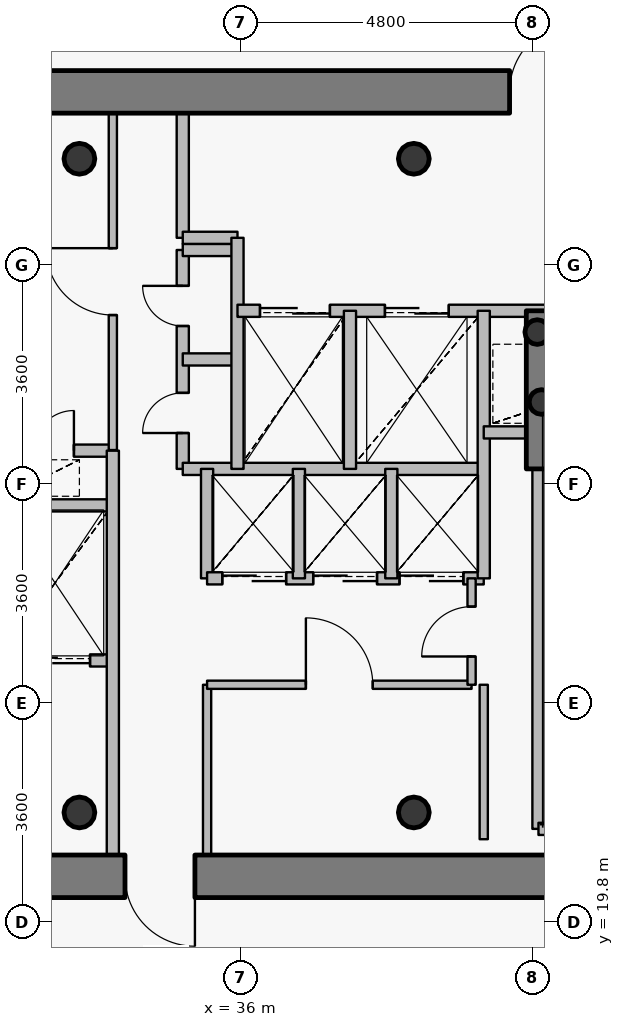
"""IFC4 building model, lengths in metres.
Left out: names, types, materials, properties, quantities, classifications, styles, units other than length and angle.
Written with IfcOpenShell. Run it as: python <this file> out.ifc"""

import sys

from ifc_helpers import new_model, si_unit, direction, frame, frame_2d, origin, origin_2d, place, context, subcontext, project, spatial, rectangle, hollow_circle, extrude, source, transform, mapped, element, fill, save


model = new_model("IFC4")
c1 = context("Model", 3, precision=1e-05, world=origin(), true_north=direction((0.0, 1.0)))
c2 = subcontext(c1, "Body", "Model", "MODEL_VIEW")
j1 = project(units=[si_unit("LENGTHUNIT", "METRE"), si_unit("PLANEANGLEUNIT", "RADIAN")], contexts=[c1])
p1 = place(None, origin())
s1 = spatial("IfcSite", under=j1, at=p1, CompositionType="ELEMENT")
p2 = place(p1, origin())
s2 = spatial("IfcBuilding", under=s1, at=p2, CompositionType="ELEMENT")
p3 = place(p2, frame((0.0, 0.0, 306.75)))
s3 = spatial("IfcBuildingStorey", under=s2, at=p3, CompositionType="ELEMENT", Elevation=306.75)
for number, where, z_axis, x_axis in (
    (1, (33.35, 21.6, 0.0), (0.0, 0.0, 1.0), (1.0, 0.0, 0.0)),
    (2, (38.85, 21.6, 0.0), (0.0, 0.0, 1.0), (1.0, 0.0, 0.0)),
    (3, (38.85, 32.35, 0.0), (0.0, 0.0, 1.0), (1.0, 0.0, 0.0)),
    (4, (33.35, 32.35, 0.0), (0.0, 0.0, 1.0), (1.0, 0.0, 0.0)),
):
    element("IfcColumn", number, at=place(p3, frame(where, z_axis=z_axis, x_axis=x_axis)), inside=s3, PredefinedType="COLUMN", context=c2, shape_type="SweptSolid", body=[
        extrude(hollow_circle(Radius=0.254, WallThickness=0.02, at=origin_2d()), origin(), (0.0, 0.0, 1.0), 3.75),
    ])
for number, where, z_axis, x_axis in (
    (5, (40.95, 28.35, 0.0), (0.0, 0.0, 1.0), (1.0, 0.0, 0.0)),
    (6, (40.88, 29.5, 0.0), (0.0, 0.0, 1.0), (1.0, 0.0, 0.0)),
):
    element("IfcColumn", number, at=place(p3, frame(where, z_axis=z_axis, x_axis=x_axis)), inside=s3, PredefinedType="COLUMN", context=c2, shape_type="SweptSolid", body=[
        extrude(hollow_circle(Radius=0.203, WallThickness=0.016, at=origin_2d()), origin(), (0.0, 0.0, 1.0), 3.75),
    ])
p4 = place(p3, frame((27.65, 33.45, 0.0), z_axis=(0.0, 0.0, 1.0), x_axis=(1.0, 0.0, 0.0)))
e7 = element("IfcWall", 7, at=p4, inside=s3, PredefinedType="SHEAR", context=c2, shape_type="SweptSolid", body=[
    extrude(rectangle(XDim=16.7, YDim=0.7, at=frame_2d((8.35, 0.0))), origin(), (0.0, 0.0, 1.0), 3.05),
])
p5 = place(p4, frame((12.775, 0.0, 0.0)))
e8 = element("IfcOpeningElement", 8, at=p5, cuts=e7, PredefinedType="OPENING", context=c2, shape_type="SweptSolid", body=[
    extrude(rectangle(XDim=1.15, YDim=2.15, at=origin_2d()), frame((0.575, 0.36, 1.075), z_axis=(0.0, -1.0, 0.0), x_axis=(1.0, 0.0, 0.0)), (0.0, 0.0, 1.0), 0.72),
])
p6 = place(p3, frame((44.35, 20.55, 0.0), z_axis=(0.0, 0.0, 1.0), x_axis=(-1.0, 0.0, 0.0)))
e9 = element("IfcWall", 9, at=p6, inside=s3, PredefinedType="SHEAR", context=c2, shape_type="SweptSolid", body=[
    extrude(rectangle(XDim=16.7, YDim=0.7, at=frame_2d((8.35, 0.0))), origin(), (0.0, 0.0, 1.0), 3.05),
])
p7 = place(p6, frame((12.925, 0.0, 0.0)))
e10 = element("IfcOpeningElement", 10, at=p7, cuts=e9, PredefinedType="OPENING", context=c2, shape_type="SweptSolid", body=[
    extrude(rectangle(XDim=1.15, YDim=2.15, at=origin_2d()), frame((0.575, 0.36, 1.075), z_axis=(0.0, -1.0, 0.0), x_axis=(1.0, 0.0, 0.0)), (0.0, 0.0, 1.0), 0.72),
])
p8 = place(p6, frame((9.1, 0.0, 0.0)))
e11 = element("IfcOpeningElement", 11, at=p8, cuts=e9, PredefinedType="OPENING", context=c2, shape_type="SweptSolid", body=[
    extrude(rectangle(XDim=1.15, YDim=2.15, at=origin_2d()), frame((0.575, 0.36, 1.075), z_axis=(0.0, -1.0, 0.0), x_axis=(1.0, 0.0, 0.0)), (0.0, 0.0, 1.0), 0.72),
])
p9 = place(p3, frame((40.9, 27.25, 0.0), z_axis=(0.0, 0.0, 1.0), x_axis=(0.0, 1.0, 0.0)))
e12 = element("IfcWall", 12, at=p9, inside=s3, PredefinedType="SHEAR", context=c2, shape_type="SweptSolid", body=[
    extrude(rectangle(XDim=2.6, YDim=0.4, at=frame_2d((1.3, 0.0))), origin(), (0.0, 0.0, 1.0), 3.1),
])
p10 = place(p3, frame((31.1, 27.55, 0.0), z_axis=(0.0, 0.0, 1.0), x_axis=(1.0, 0.0, 0.0)))
e13 = element("IfcWall", 13, at=p10, inside=s3, PredefinedType="PARTITIONING", context=c2, shape_type="SweptSolid", body=[
    extrude(rectangle(XDim=2.8, YDim=0.2, at=frame_2d((1.4, 0.0))), origin(), (0.0, 0.0, 1.0), 3.085),
])
p11 = place(p10, frame((1.5, 0.0, 0.0)))
e14 = element("IfcOpeningElement", 14, at=p11, cuts=e13, PredefinedType="OPENING", context=c2, shape_type="SweptSolid", body=[
    extrude(rectangle(XDim=0.66, YDim=2.05, at=origin_2d()), frame((0.33, 0.11, 1.025), z_axis=(0.0, -1.0, 0.0), x_axis=(1.0, 0.0, 0.0)), (0.0, 0.0, 1.0), 0.22),
])
p12 = place(p3, frame((32.0, 24.1, 0.0), z_axis=(0.0, 0.0, 1.0), x_axis=(1.0, 0.0, 0.0)))
e15 = element("IfcWall", 15, at=p12, inside=s3, PredefinedType="PARTITIONING", context=c2, shape_type="SweptSolid", body=[
    extrude(rectangle(XDim=1.9, YDim=0.2, at=frame_2d((0.95, 0.0))), origin(), (0.0, 0.0, 1.0), 3.085),
])
p13 = place(p12, frame((0.375, 0.0, 0.0)))
e16 = element("IfcOpeningElement", 16, at=p13, cuts=e15, PredefinedType="OPENING", context=c2, shape_type="SweptSolid", body=[
    extrude(rectangle(XDim=1.15, YDim=2.15, at=origin_2d()), frame((0.575, 0.11, 1.075), z_axis=(0.0, -1.0, 0.0), x_axis=(1.0, 0.0, 0.0)), (0.0, 0.0, 1.0), 0.22),
])
p14 = place(p3, frame((32.0, 26.65, 0.0), z_axis=(0.0, 0.0, 1.0), x_axis=(1.0, 0.0, 0.0)))
e17 = element("IfcWall", 17, at=p14, inside=s3, PredefinedType="PARTITIONING", context=c2, shape_type="SweptSolid", body=[
    extrude(rectangle(XDim=1.9, YDim=0.2, at=frame_2d((0.95, 0.0))), origin(), (0.0, 0.0, 1.0), 3.085),
])
p15 = place(p3, frame((33.9, 20.9, 0.0), z_axis=(0.0, 0.0, 1.0), x_axis=(0.0, 1.0, 0.0)))
e18 = element("IfcWall", 18, at=p15, inside=s3, PredefinedType="PARTITIONING", context=c2, shape_type="SweptSolid", body=[
    extrude(rectangle(XDim=6.65, YDim=0.2, at=frame_2d((3.325, 0.0))), origin(), (0.0, 0.0, 1.0), 3.085),
])
p16 = place(p3, frame((33.9, 27.56, 0.0), z_axis=(0.0, 0.0, 1.0), x_axis=(0.0, 1.0, 0.0)))
e19 = element("IfcWall", 19, at=p16, inside=s3, PredefinedType="PARTITIONING", context=c2, shape_type="SweptSolid", body=[
    extrude(rectangle(XDim=5.54, YDim=0.135, at=frame_2d((2.77, 0.0))), origin(), (0.0, 0.0, 1.0), 3.085),
])
p17 = place(p16, frame((2.22, 0.0, 0.0)))
e20 = element("IfcOpeningElement", 20, at=p17, cuts=e19, PredefinedType="OPENING", context=c2, shape_type="SweptSolid", body=[
    extrude(rectangle(XDim=1.1, YDim=2.15, at=origin_2d()), frame((0.55, 0.078, 1.075), z_axis=(0.0, -1.0, 0.0), x_axis=(1.0, 0.0, 0.0)), (0.0, 0.0, 1.0), 0.155),
])
p18 = place(p3, frame((35.05, 27.25, 0.0), z_axis=(0.0, 0.0, 1.0), x_axis=(0.0, 1.0, 0.0)))
e21 = element("IfcWall", 21, at=p18, inside=s3, PredefinedType="PARTITIONING", context=c2, shape_type="SweptSolid", body=[
    extrude(rectangle(XDim=3.6, YDim=0.2, at=frame_2d((1.8, 0.0))), origin(), (0.0, 0.0, 1.0), 3.5),
])
p19 = place(p18, frame((0.59, 0.0, 0.0)))
e22 = element("IfcOpeningElement", 22, at=p19, cuts=e21, PredefinedType="OPENING", context=c2, shape_type="SweptSolid", body=[
    extrude(rectangle(XDim=0.66, YDim=2.05, at=origin_2d()), frame((0.33, 0.11, 1.025), z_axis=(0.0, -1.0, 0.0), x_axis=(1.0, 0.0, 0.0)), (0.0, 0.0, 1.0), 0.22),
])
p20 = place(p18, frame((2.35, 0.0, 0.0)))
e23 = element("IfcOpeningElement", 23, at=p20, cuts=e21, PredefinedType="OPENING", context=c2, shape_type="SweptSolid", body=[
    extrude(rectangle(XDim=0.66, YDim=2.05, at=origin_2d()), frame((0.33, 0.11, 1.025), z_axis=(0.0, -1.0, 0.0), x_axis=(1.0, 0.0, 0.0)), (0.0, 0.0, 1.0), 0.22),
])
p21 = place(p3, frame((35.05, 27.25, 0.0), z_axis=(0.0, 0.0, 1.0), x_axis=(1.0, 0.0, 0.0)))
e24 = element("IfcWall", 24, at=p21, inside=s3, PredefinedType="PARTITIONING", context=c2, shape_type="SweptSolid", body=[
    extrude(rectangle(XDim=4.95, YDim=0.2, at=frame_2d((2.475, 0.0))), origin(), (0.0, 0.0, 1.0), 3.085),
])
for number, where, z_axis, x_axis in (
    (25, (35.05, 29.05, 0.0), (0.0, 0.0, 1.0), (1.0, 0.0, 0.0)),
    (26, (35.05, 30.85, 0.0), (0.0, 0.0, 1.0), (1.0, 0.0, 0.0)),
):
    element("IfcWall", number, at=place(p3, frame(where, z_axis=z_axis, x_axis=x_axis)), inside=s3, PredefinedType="PARTITIONING", context=c2, shape_type="SweptSolid", body=[
        extrude(rectangle(XDim=0.9, YDim=0.2, at=frame_2d((0.45, 0.0))), origin(), (0.0, 0.0, 1.0), 3.5),
    ])
p22 = place(p3, frame((35.05, 31.05, 0.0), z_axis=(0.0, 0.0, 1.0), x_axis=(0.0, 1.0, 0.0)))
e27 = element("IfcWall", 27, at=p22, inside=s3, PredefinedType="PARTITIONING", context=c2, shape_type="SweptSolid", body=[
    extrude(rectangle(XDim=2.05, YDim=0.2, at=frame_2d((1.025, 0.0))), origin(), (0.0, 0.0, 1.0), 3.085),
])
p23 = place(p3, frame((35.05, 31.05, 0.0), z_axis=(0.0, 0.0, 1.0), x_axis=(1.0, 0.0, 0.0)))
e28 = element("IfcWall", 28, at=p23, inside=s3, PredefinedType="PARTITIONING", context=c2, shape_type="SweptSolid", body=[
    extrude(rectangle(XDim=0.9, YDim=0.2, at=frame_2d((0.45, 0.0))), origin(), (0.0, 0.0, 1.0), 3.5),
])
p24 = place(p3, frame((35.45, 20.9, 0.0), z_axis=(0.0, 0.0, 1.0), x_axis=(0.0, 1.0, 0.0)))
e29 = element("IfcWall", 29, at=p24, inside=s3, PredefinedType="PARTITIONING", context=c2, shape_type="SweptSolid", body=[
    extrude(rectangle(XDim=2.8, YDim=0.135, at=frame_2d((1.4, 0.0))), origin(), (0.0, 0.0, 1.0), 3.085),
])
p25 = place(p3, frame((35.45, 23.7, 0.0), z_axis=(0.0, 0.0, 1.0), x_axis=(1.0, 0.0, 0.0)))
e30 = element("IfcWall", 30, at=p25, inside=s3, PredefinedType="PARTITIONING", context=c2, shape_type="SweptSolid", body=[
    extrude(rectangle(XDim=4.35, YDim=0.135, at=frame_2d((2.175, 0.0))), origin(), (0.0, 0.0, 1.0), 3.085),
])
p26 = place(p25, frame((1.625, 0.0, 0.0)))
e31 = element("IfcOpeningElement", 31, at=p26, cuts=e30, PredefinedType="OPENING", context=c2, shape_type="SweptSolid", body=[
    extrude(rectangle(XDim=1.1, YDim=2.15, at=origin_2d()), frame((0.55, 0.078, 1.075), z_axis=(0.0, -1.0, 0.0), x_axis=(1.0, 0.0, 0.0)), (0.0, 0.0, 1.0), 0.155),
])
p27 = place(p3, frame((35.45, 25.45, 0.0), z_axis=(0.0, 0.0, 1.0), x_axis=(0.0, 1.0, 0.0)))
e32 = element("IfcWall", 32, at=p27, inside=s3, PredefinedType="PARTITIONING", context=c2, shape_type="SweptSolid", body=[
    extrude(rectangle(XDim=1.8, YDim=0.2, at=frame_2d((0.9, 0.0))), origin(), (0.0, 0.0, 1.0), 3.5),
])
p28 = place(p3, frame((35.45, 25.45, 0.0), z_axis=(0.0, 0.0, 1.0), x_axis=(1.0, 0.0, 0.0)))
e33 = element("IfcWall", 33, at=p28, inside=s3, PredefinedType="PARTITIONING", context=c2, shape_type="SweptSolid", body=[
    extrude(rectangle(XDim=4.55, YDim=0.2, at=frame_2d((2.275, 0.0))), origin(), (0.0, 0.0, 1.0), 3.085),
])
p29 = place(p28, frame((0.25, 0.0, 0.0)))
e34 = element("IfcOpeningElement", 34, at=p29, cuts=e33, PredefinedType="OPENING", context=c2, shape_type="SweptSolid", body=[
    extrude(rectangle(XDim=1.05, YDim=2.15, at=origin_2d()), frame((0.525, 0.11, 1.075), z_axis=(0.0, -1.0, 0.0), x_axis=(1.0, 0.0, 0.0)), (0.0, 0.0, 1.0), 0.22),
])
p30 = place(p28, frame((1.745, 0.0, 0.0)))
e35 = element("IfcOpeningElement", 35, at=p30, cuts=e33, PredefinedType="OPENING", context=c2, shape_type="SweptSolid", body=[
    extrude(rectangle(XDim=1.05, YDim=2.15, at=origin_2d()), frame((0.525, 0.11, 1.075), z_axis=(0.0, -1.0, 0.0), x_axis=(1.0, 0.0, 0.0)), (0.0, 0.0, 1.0), 0.22),
])
p31 = place(p28, frame((3.165, 0.0, 0.0)))
e36 = element("IfcOpeningElement", 36, at=p31, cuts=e33, PredefinedType="OPENING", context=c2, shape_type="SweptSolid", body=[
    extrude(rectangle(XDim=1.05, YDim=2.15, at=origin_2d()), frame((0.525, 0.11, 1.075), z_axis=(0.0, -1.0, 0.0), x_axis=(1.0, 0.0, 0.0)), (0.0, 0.0, 1.0), 0.22),
])
p32 = place(p3, frame((35.95, 27.25, 0.0), z_axis=(0.0, 0.0, 1.0), x_axis=(0.0, 1.0, 0.0)))
e37 = element("IfcWall", 37, at=p32, inside=s3, PredefinedType="PARTITIONING", context=c2, shape_type="SweptSolid", body=[
    extrude(rectangle(XDim=3.8, YDim=0.2, at=frame_2d((1.9, 0.0))), origin(), (0.0, 0.0, 1.0), 3.5),
])
p33 = place(p3, frame((35.95, 29.85, 0.0), z_axis=(0.0, 0.0, 1.0), x_axis=(1.0, 0.0, 0.0)))
e38 = element("IfcWall", 38, at=p33, inside=s3, PredefinedType="PARTITIONING", context=c2, shape_type="SweptSolid", body=[
    extrude(rectangle(XDim=8.49, YDim=0.2, at=frame_2d((4.245, 0.0))), origin(), (0.0, 0.0, 1.0), 3.085),
])
p34 = place(p33, frame((6.1, 0.0, 0.0)))
e39 = element("IfcOpeningElement", 39, at=p34, cuts=e38, PredefinedType="OPENING", context=c2, shape_type="SweptSolid", body=[
    extrude(rectangle(XDim=1.2, YDim=2.15, at=origin_2d()), frame((0.6, 0.11, 1.075), z_axis=(0.0, -1.0, 0.0), x_axis=(1.0, 0.0, 0.0)), (0.0, 0.0, 1.0), 0.22),
])
p35 = place(p33, frame((0.37, 0.0, 0.0)))
e40 = element("IfcOpeningElement", 40, at=p35, cuts=e38, PredefinedType="OPENING", context=c2, shape_type="SweptSolid", body=[
    extrude(rectangle(XDim=1.15, YDim=2.15, at=origin_2d()), frame((0.575, 0.11, 1.075), z_axis=(0.0, -1.0, 0.0), x_axis=(1.0, 0.0, 0.0)), (0.0, 0.0, 1.0), 0.22),
])
p36 = place(p33, frame((2.425, 0.0, 0.0)))
e41 = element("IfcOpeningElement", 41, at=p36, cuts=e38, PredefinedType="OPENING", context=c2, shape_type="SweptSolid", body=[
    extrude(rectangle(XDim=1.05, YDim=2.15, at=origin_2d()), frame((0.525, 0.11, 1.075), z_axis=(0.0, -1.0, 0.0), x_axis=(1.0, 0.0, 0.0)), (0.0, 0.0, 1.0), 0.22),
])
p37 = place(p3, frame((36.96, 25.45, 0.0), z_axis=(0.0, 0.0, 1.0), x_axis=(0.0, 1.0, 0.0)))
e42 = element("IfcWall", 42, at=p37, inside=s3, PredefinedType="PARTITIONING", context=c2, shape_type="SweptSolid", body=[
    extrude(rectangle(XDim=1.8, YDim=0.2, at=frame_2d((0.9, 0.0))), origin(), (0.0, 0.0, 1.0), 3.5),
])
p38 = place(p3, frame((37.8, 27.25, 0.0), z_axis=(0.0, 0.0, 1.0), x_axis=(0.0, 1.0, 0.0)))
e43 = element("IfcWall", 43, at=p38, inside=s3, PredefinedType="PARTITIONING", context=c2, shape_type="SweptSolid", body=[
    extrude(rectangle(XDim=2.6, YDim=0.2, at=frame_2d((1.3, 0.0))), origin(), (0.0, 0.0, 1.0), 3.5),
])
p39 = place(p3, frame((38.48, 25.45, 0.0), z_axis=(0.0, 0.0, 1.0), x_axis=(0.0, 1.0, 0.0)))
e44 = element("IfcWall", 44, at=p39, inside=s3, PredefinedType="PARTITIONING", context=c2, shape_type="SweptSolid", body=[
    extrude(rectangle(XDim=1.8, YDim=0.2, at=frame_2d((0.9, 0.0))), origin(), (0.0, 0.0, 1.0), 3.5),
])
p40 = place(p3, frame((39.8, 23.7, 0.0), z_axis=(0.0, 0.0, 1.0), x_axis=(0.0, 1.0, 0.0)))
e45 = element("IfcWall", 45, at=p40, inside=s3, PredefinedType="PARTITIONING", context=c2, shape_type="SweptSolid", body=[
    extrude(rectangle(XDim=1.75, YDim=0.135, at=frame_2d((0.875, 0.0))), origin(), (0.0, 0.0, 1.0), 3.5),
])
p41 = place(p40, frame((0.465, 0.0, 0.0)))
e46 = element("IfcOpeningElement", 46, at=p41, cuts=e45, PredefinedType="OPENING", context=c2, shape_type="SweptSolid", body=[
    extrude(rectangle(XDim=0.82, YDim=2.1, at=origin_2d()), frame((0.41, 0.078, 1.05), z_axis=(0.0, -1.0, 0.0), x_axis=(1.0, 0.0, 0.0)), (0.0, 0.0, 1.0), 0.155),
])
p42 = place(p3, frame((40.0, 25.45, 0.0), z_axis=(0.0, 0.0, 1.0), x_axis=(0.0, 1.0, 0.0)))
e47 = element("IfcWall", 47, at=p42, inside=s3, PredefinedType="PARTITIONING", context=c2, shape_type="SweptSolid", body=[
    extrude(rectangle(XDim=4.4, YDim=0.2, at=frame_2d((2.2, 0.0))), origin(), (0.0, 0.0, 1.0), 3.5),
])
p43 = place(p3, frame((40.0, 27.85, 0.0), z_axis=(0.0, 0.0, 1.0), x_axis=(1.0, 0.0, 0.0)))
e48 = element("IfcWall", 48, at=p43, inside=s3, PredefinedType="PARTITIONING", context=c2, shape_type="SweptSolid", body=[
    extrude(rectangle(XDim=0.9, YDim=0.2, at=frame_2d((0.45, 0.0))), origin(), (0.0, 0.0, 1.0), 3.5),
])
p44 = place(p3, frame((40.9, 21.33, 0.0), z_axis=(0.0, 0.0, 1.0), x_axis=(0.0, 1.0, 0.0)))
e49 = element("IfcWall", 49, at=p44, inside=s3, PredefinedType="PARTITIONING", context=c2, shape_type="SweptSolid", body=[
    extrude(rectangle(XDim=5.91, YDim=0.2, at=frame_2d((2.955, 0.0))), origin(), (0.0, 0.0, 1.0), 3.035),
])
p45 = place(p3, frame((40.9, 21.33, 0.0), z_axis=(0.0, 0.0, 1.0), x_axis=(1.0, 0.0, 0.0)))
e50 = element("IfcWall", 50, at=p45, inside=s3, PredefinedType="PARTITIONING", context=c2, shape_type="SweptSolid", body=[
    extrude(rectangle(XDim=0.25, YDim=0.2, at=frame_2d((0.125, 0.0))), origin(), (0.0, 0.0, 1.0), 3.035),
])
p46 = place(p3, frame((40.0, 23.7, 0.0), z_axis=(0.0, 0.0, 1.0), x_axis=(0.0, -1.0, 0.0)))
e51 = element("IfcWall", 51, at=p46, inside=s3, PredefinedType="PARTITIONING", context=c2, shape_type="SweptSolid", body=[
    extrude(rectangle(XDim=2.54, YDim=0.135, at=frame_2d((1.27, 0.0))), origin(), (0.0, 0.0, 1.0), 3.035),
])
m1 = source(origin(), c2, "Body", "SweptSolid", [
    extrude(rectangle(XDim=1.15, YDim=2.15, at=origin_2d()), frame((0.575, 0.025, 1.075), z_axis=(0.0, -1.0, 0.0), x_axis=(1.0, 0.0, 0.0)), (0.0, 0.0, 1.0), 0.05),
])
p47 = place(p5, origin())
e52 = element("IfcDoor", 52, at=p47, inside=s3, OperationType="SINGLE_SWING_RIGHT", PredefinedType="DOOR", context=c2, shape_type="MappedRepresentation", body=[
    mapped(m1, transform((0.0, 0.0, 0.0), x_axis=(1.0, 0.0, 0.0), y_axis=(0.0, 1.0, 0.0), z_axis=(0.0, 0.0, 1.0), scale=1.0)),
])
fill(e8, e52)
p48 = place(p8, origin())
e53 = element("IfcDoor", 53, at=p48, inside=s3, OperationType="SINGLE_SWING_LEFT", PredefinedType="DOOR", context=c2, shape_type="MappedRepresentation", body=[
    mapped(m1, transform((0.0, 0.0, 0.0), x_axis=(1.0, 0.0, 0.0), y_axis=(0.0, 1.0, 0.0), z_axis=(0.0, 0.0, 1.0), scale=1.0)),
])
fill(e11, e53)
m2 = source(origin(), c2, "Body", "SweptSolid", [
    extrude(rectangle(XDim=1.15, YDim=2.15, at=origin_2d()), frame((0.575, 0.025, 1.075), z_axis=(0.0, -1.0, 0.0), x_axis=(1.0, 0.0, 0.0)), (0.0, 0.0, 1.0), 0.05),
])
p49 = place(p35, origin())
e54 = element("IfcDoor", 54, at=p49, inside=s3, OperationType="DOUBLE_DOOR_SLIDING", PredefinedType="USERDEFINED", context=c2, shape_type="MappedRepresentation", body=[
    mapped(m2, transform((0.0, 0.0, 0.0), x_axis=(1.0, 0.0, 0.0), y_axis=(0.0, 1.0, 0.0), z_axis=(0.0, 0.0, 1.0), scale=1.0)),
])
fill(e40, e54)
p50 = place(p13, origin())
e55 = element("IfcDoor", 55, at=p50, inside=s3, OperationType="DOUBLE_DOOR_SLIDING", PredefinedType="USERDEFINED", context=c2, shape_type="MappedRepresentation", body=[
    mapped(m2, transform((0.0, 0.0, 0.0), x_axis=(1.0, 0.0, 0.0), y_axis=(0.0, 1.0, 0.0), z_axis=(0.0, 0.0, 1.0), scale=1.0)),
])
fill(e16, e55)
m3 = source(origin(), c2, "Body", "SweptSolid", [
    extrude(rectangle(XDim=1.05, YDim=2.15, at=origin_2d()), frame((0.525, 0.025, 1.075), z_axis=(0.0, -1.0, 0.0), x_axis=(1.0, 0.0, 0.0)), (0.0, 0.0, 1.0), 0.05),
])
p51 = place(p36, origin())
e56 = element("IfcDoor", 56, at=p51, inside=s3, OperationType="DOUBLE_DOOR_SLIDING", PredefinedType="USERDEFINED", context=c2, shape_type="MappedRepresentation", body=[
    mapped(m3, transform((0.0, 0.0, 0.0), x_axis=(1.0, 0.0, 0.0), y_axis=(0.0, 1.0, 0.0), z_axis=(0.0, 0.0, 1.0), scale=1.0)),
])
fill(e41, e56)
p52 = place(p29, origin())
e57 = element("IfcDoor", 57, at=p52, inside=s3, OperationType="DOUBLE_DOOR_SLIDING", PredefinedType="USERDEFINED", context=c2, shape_type="MappedRepresentation", body=[
    mapped(m3, transform((0.0, 0.0, 0.0), x_axis=(1.0, 0.0, 0.0), y_axis=(0.0, 1.0, 0.0), z_axis=(0.0, 0.0, 1.0), scale=1.0)),
])
fill(e34, e57)
p53 = place(p30, origin())
e58 = element("IfcDoor", 58, at=p53, inside=s3, OperationType="DOUBLE_DOOR_SLIDING", PredefinedType="USERDEFINED", context=c2, shape_type="MappedRepresentation", body=[
    mapped(m3, transform((0.0, 0.0, 0.0), x_axis=(1.0, 0.0, 0.0), y_axis=(0.0, 1.0, 0.0), z_axis=(0.0, 0.0, 1.0), scale=1.0)),
])
fill(e35, e58)
p54 = place(p31, origin())
e59 = element("IfcDoor", 59, at=p54, inside=s3, OperationType="DOUBLE_DOOR_SLIDING", PredefinedType="USERDEFINED", context=c2, shape_type="MappedRepresentation", body=[
    mapped(m3, transform((0.0, 0.0, 0.0), x_axis=(1.0, 0.0, 0.0), y_axis=(0.0, 1.0, 0.0), z_axis=(0.0, 0.0, 1.0), scale=1.0)),
])
fill(e36, e59)
m4 = source(origin(), c2, "Body", "SweptSolid", [
    extrude(rectangle(XDim=0.66, YDim=2.05, at=origin_2d()), frame((0.33, 0.025, 1.025), z_axis=(0.0, -1.0, 0.0), x_axis=(1.0, 0.0, 0.0)), (0.0, 0.0, 1.0), 0.05),
])
p55 = place(p19, origin())
e60 = element("IfcDoor", 60, at=p55, inside=s3, OperationType="SINGLE_SWING_LEFT", PredefinedType="USERDEFINED", context=c2, shape_type="MappedRepresentation", body=[
    mapped(m4, transform((0.0, 0.0, 0.0), x_axis=(1.0, 0.0, 0.0), y_axis=(0.0, 1.0, 0.0), z_axis=(0.0, 0.0, 1.0), scale=1.0)),
])
fill(e22, e60)
p56 = place(p20, origin())
e61 = element("IfcDoor", 61, at=p56, inside=s3, OperationType="SINGLE_SWING_RIGHT", PredefinedType="USERDEFINED", context=c2, shape_type="MappedRepresentation", body=[
    mapped(m4, transform((0.0, 0.0, 0.0), x_axis=(1.0, 0.0, 0.0), y_axis=(0.0, 1.0, 0.0), z_axis=(0.0, 0.0, 1.0), scale=1.0)),
])
fill(e23, e61)
m5 = source(origin(), c2, "Body", "SweptSolid", [
    extrude(rectangle(XDim=1.1, YDim=2.15, at=origin_2d()), frame((0.55, 0.025, 1.075), z_axis=(0.0, -1.0, 0.0), x_axis=(1.0, 0.0, 0.0)), (0.0, 0.0, 1.0), 0.05),
])
p57 = place(p26, origin())
e62 = element("IfcDoor", 62, at=p57, inside=s3, OperationType="SINGLE_SWING_LEFT", PredefinedType="DOOR", context=c2, shape_type="MappedRepresentation", body=[
    mapped(m5, transform((0.0, 0.0, 0.0), x_axis=(1.0, 0.0, 0.0), y_axis=(0.0, 1.0, 0.0), z_axis=(0.0, 0.0, 1.0), scale=1.0)),
])
fill(e31, e62)
p58 = place(p17, origin())
e63 = element("IfcDoor", 63, at=p58, inside=s3, OperationType="SINGLE_SWING_RIGHT", PredefinedType="DOOR", context=c2, shape_type="MappedRepresentation", body=[
    mapped(m5, transform((0.0, 0.0, 0.0), x_axis=(1.0, 0.0, 0.0), y_axis=(0.0, 1.0, 0.0), z_axis=(0.0, 0.0, 1.0), scale=1.0)),
])
fill(e20, e63)
m6 = source(origin(), c2, "Body", "SweptSolid", [
    extrude(rectangle(XDim=0.82, YDim=2.1, at=origin_2d()), frame((0.41, 0.025, 1.05), z_axis=(0.0, -1.0, 0.0), x_axis=(1.0, 0.0, 0.0)), (0.0, 0.0, 1.0), 0.05),
])
p59 = place(p41, origin())
e64 = element("IfcDoor", 64, at=p59, inside=s3, OperationType="SINGLE_SWING_LEFT", PredefinedType="DOOR", context=c2, shape_type="MappedRepresentation", body=[
    mapped(m6, transform((0.0, 0.0, 0.0), x_axis=(1.0, 0.0, 0.0), y_axis=(0.0, 1.0, 0.0), z_axis=(0.0, 0.0, 1.0), scale=1.0)),
])
fill(e46, e64)
p60 = place(p11, origin())
e65 = element("IfcDoor", 65, at=p60, inside=s3, OperationType="SINGLE_SWING_RIGHT", PredefinedType="USERDEFINED", context=c2, shape_type="MappedRepresentation", body=[
    mapped(m4, transform((0.0, 0.0, 0.0), x_axis=(1.0, 0.0, 0.0), y_axis=(0.0, 1.0, 0.0), z_axis=(0.0, 0.0, 1.0), scale=1.0)),
])
fill(e14, e65)
save(model, sys.argv[1])
